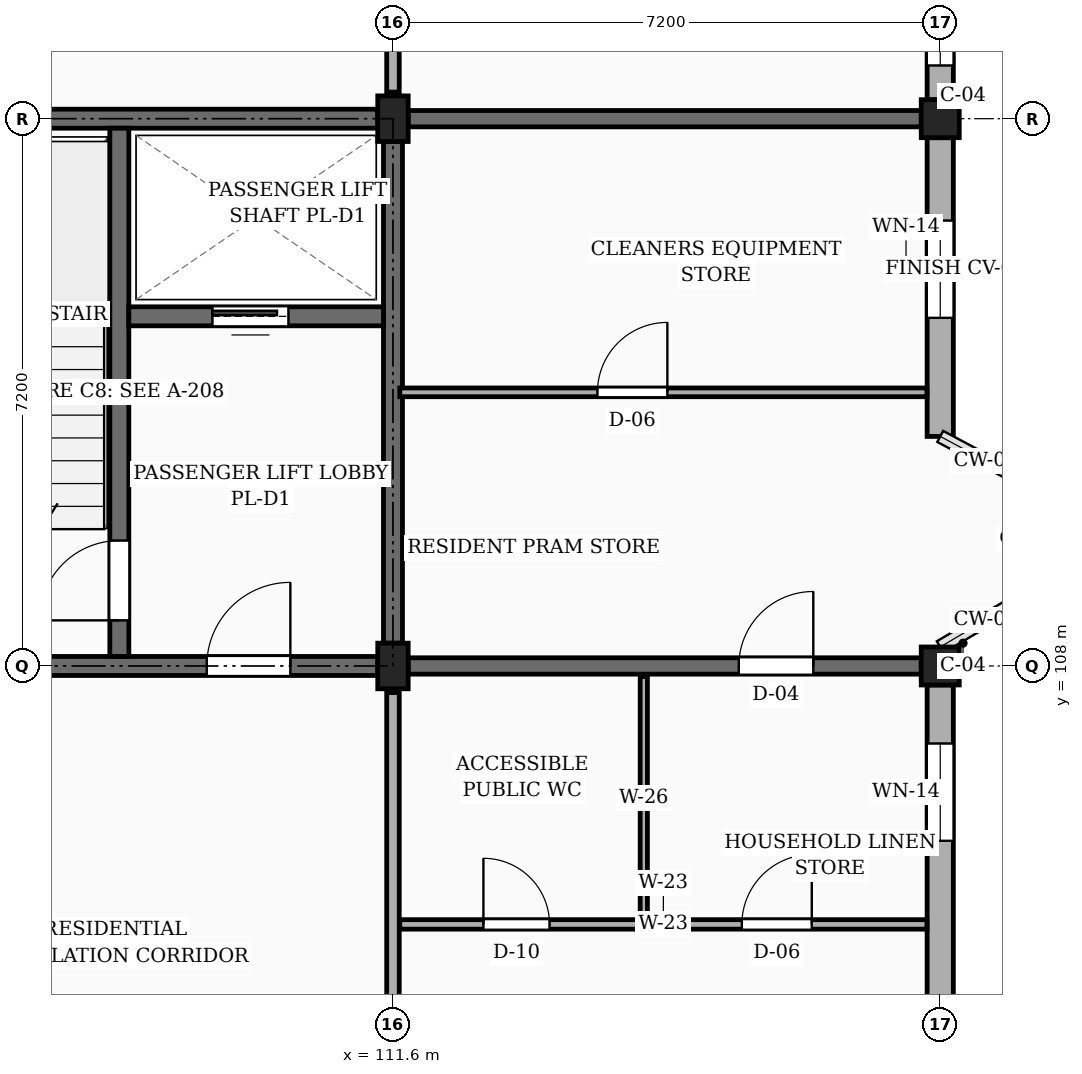
"""IFC4 building model, lengths in metres.
Left out: names, types, materials, properties, quantities, classifications, styles, units other than length and angle.
Written with IfcOpenShell. Run it as: python <this file> out.ifc"""

import sys

from ifc_helpers import new_model, si_unit, direction, frame, frame_2d, origin, origin_2d, place, context, subcontext, project, spatial, rectangle, extrude, element, fill, save


model = new_model("IFC4")
c1 = context("Model", 3, precision=1e-05, world=origin(), true_north=direction((0.0, 1.0)))
c2 = subcontext(c1, "Body", "Model", "MODEL_VIEW")
j1 = project(units=[si_unit("LENGTHUNIT", "METRE"), si_unit("PLANEANGLEUNIT", "RADIAN")], contexts=[c1])
p1 = place(None, origin())
s1 = spatial("IfcSite", under=j1, at=p1, CompositionType="ELEMENT")
p2 = place(p1, origin())
s2 = spatial("IfcBuilding", under=s1, at=p2, CompositionType="ELEMENT")
p3 = place(p2, frame((0.0, 0.0, 29.7)))
s3 = spatial("IfcBuildingStorey", under=s2, at=p3, CompositionType="ELEMENT", Elevation=29.7)
for number, where, z_axis, x_axis in (
    (1, (111.6, 108.0, 0.0), (0.0, 0.0, 1.0), (1.0, 0.0, 0.0)),
    (2, (111.6, 115.2, 0.0), (0.0, 0.0, 1.0), (1.0, 0.0, 0.0)),
):
    element("IfcColumn", number, at=place(p3, frame(where, z_axis=z_axis, x_axis=x_axis)), inside=s3, PredefinedType="COLUMN", context=c2, shape_type="SweptSolid", body=[
        extrude(rectangle(XDim=0.4, YDim=0.6, at=origin_2d()), origin(), (0.0, 0.0, 1.0), 3.15),
    ])
for number, where, z_axis, x_axis in (
    (3, (118.8, 108.0, 0.0), (0.0, 0.0, 1.0), (1.0, 0.0, 0.0)),
    (4, (118.8, 115.2, 0.0), (0.0, 0.0, 1.0), (1.0, 0.0, 0.0)),
):
    element("IfcColumn", number, at=place(p3, frame(where, z_axis=z_axis, x_axis=x_axis)), inside=s3, PredefinedType="COLUMN", context=c2, shape_type="SweptSolid", body=[
        extrude(rectangle(XDim=0.5, YDim=0.5, at=origin_2d()), origin(), (0.0, 0.0, 1.0), 3.15),
    ])
p4 = place(p3, frame((111.8, 108.0, 0.0), z_axis=(0.0, 0.0, 1.0), x_axis=(1.0, 0.0, 0.0)))
e5 = element("IfcWall", 5, at=p4, inside=s3, PredefinedType="SOLIDWALL", context=c2, shape_type="SweptSolid", body=[
    extrude(rectangle(XDim=6.75, YDim=0.215, at=frame_2d((3.375, 0.0))), origin(), (0.0, 0.0, 1.0), 2.19),
])
p5 = place(p4, frame((4.35, 0.0, 0.0)))
e6 = element("IfcOpeningElement", 6, at=p5, cuts=e5, PredefinedType="OPENING", context=c2, shape_type="SweptSolid", body=[
    extrude(rectangle(XDim=0.98, YDim=2.12, at=frame_2d((0.49, 1.06))), frame((0.0, 0.118, 0.0), z_axis=(0.0, -1.0, 0.0), x_axis=(1.0, 0.0, 0.0)), (0.0, 0.0, 1.0), 0.235),
])
p6 = place(p3, frame((111.8, 115.2, 0.0), z_axis=(0.0, 0.0, 1.0), x_axis=(1.0, 0.0, 0.0)))
e7 = element("IfcWall", 7, at=p6, inside=s3, PredefinedType="SOLIDWALL", context=c2, shape_type="SweptSolid", body=[
    extrude(rectangle(XDim=6.75, YDim=0.215, at=frame_2d((3.375, 0.0))), origin(), (0.0, 0.0, 1.0), 2.19),
])
p7 = place(p3, frame((118.8, 101.05, 0.0), z_axis=(0.0, 0.0, 1.0), x_axis=(0.0, 1.0, 0.0)))
e8 = element("IfcWall", 8, at=p7, inside=s3, PredefinedType="SOLIDWALL", context=c2, shape_type="SweptSolid", body=[
    extrude(rectangle(XDim=6.7, YDim=0.345, at=frame_2d((3.35, 0.0))), origin(), (0.0, 0.0, 1.0), 2.46),
])
p8 = place(p7, frame((0.45, 0.0, 0.78)))
e9 = element("IfcOpeningElement", 9, at=p8, cuts=e8, PredefinedType="OPENING", context=c2, shape_type="SweptSolid", body=[
    extrude(rectangle(XDim=1.12, YDim=1.26, at=frame_2d((0.56, 0.63))), frame((0.0, 0.183, 0.0), z_axis=(0.0, -1.0, 0.0), x_axis=(1.0, 0.0, 0.0)), (0.0, 0.0, 1.0), 0.365),
])
p9 = place(p7, frame((4.65, 0.0, 0.78)))
e10 = element("IfcOpeningElement", 10, at=p9, cuts=e8, PredefinedType="OPENING", context=c2, shape_type="SweptSolid", body=[
    extrude(rectangle(XDim=1.28, YDim=1.26, at=frame_2d((0.64, 0.63))), frame((0.0, 0.183, 0.0), z_axis=(0.0, -1.0, 0.0), x_axis=(1.0, 0.0, 0.0)), (0.0, 0.0, 1.0), 0.365),
])
p10 = place(p3, frame((118.8, 111.02, 0.0), z_axis=(0.0, 0.0, 1.0), x_axis=(0.0, 1.0, 0.0)))
e11 = element("IfcWall", 11, at=p10, inside=s3, PredefinedType="SOLIDWALL", context=c2, shape_type="SweptSolid", body=[
    extrude(rectangle(XDim=3.93, YDim=0.345, at=frame_2d((1.965, 0.0))), origin(), (0.0, 0.0, 1.0), 2.46),
])
p11 = place(p10, frame((1.56, 0.0, 0.78)))
e12 = element("IfcOpeningElement", 12, at=p11, cuts=e11, PredefinedType="OPENING", context=c2, shape_type="SweptSolid", body=[
    extrude(rectangle(XDim=1.28, YDim=1.26, at=frame_2d((0.64, 0.63))), frame((0.0, 0.183, 0.0), z_axis=(0.0, -1.0, 0.0), x_axis=(1.0, 0.0, 0.0)), (0.0, 0.0, 1.0), 0.365),
])
p12 = place(p3, frame((118.8, 115.45, 0.0), z_axis=(0.0, 0.0, 1.0), x_axis=(0.0, 1.0, 0.0)))
e13 = element("IfcWall", 13, at=p12, inside=s3, PredefinedType="SOLIDWALL", context=c2, shape_type="SweptSolid", body=[
    extrude(rectangle(XDim=6.7, YDim=0.345, at=frame_2d((3.35, 0.0))), origin(), (0.0, 0.0, 1.0), 2.46),
])
p13 = place(p12, frame((0.45, 0.0, 0.78)))
e14 = element("IfcOpeningElement", 14, at=p13, cuts=e13, PredefinedType="OPENING", context=c2, shape_type="SweptSolid", body=[
    extrude(rectangle(XDim=1.36, YDim=1.26, at=frame_2d((0.68, 0.63))), frame((0.0, 0.183, 0.0), z_axis=(0.0, -1.0, 0.0), x_axis=(1.0, 0.0, 0.0)), (0.0, 0.0, 1.0), 0.365),
])
p14 = place(p12, frame((4.65, 0.0, 0.78)))
e15 = element("IfcOpeningElement", 15, at=p14, cuts=e13, PredefinedType="OPENING", context=c2, shape_type="SweptSolid", body=[
    extrude(rectangle(XDim=0.9, YDim=1.36, at=frame_2d((0.45, 0.68))), frame((0.0, 0.183, 0.0), z_axis=(0.0, -1.0, 0.0), x_axis=(1.0, 0.0, 0.0)), (0.0, 0.0, 1.0), 0.365),
])
p15 = place(p3, frame((104.6, 115.2, 0.0), z_axis=(0.0, 0.0, 1.0), x_axis=(1.0, 0.0, 0.0)))
e16 = element("IfcWall", 16, at=p15, inside=s3, PredefinedType="SHEAR", context=c2, shape_type="SweptSolid", body=[
    extrude(rectangle(XDim=6.8, YDim=0.25, at=frame_2d((3.4, 0.0))), origin(), (0.0, 0.0, 1.0), 2.89),
])
p16 = place(p3, frame((111.6, 108.3, 0.0), z_axis=(0.0, 0.0, 1.0), x_axis=(0.0, 1.0, 0.0)))
e17 = element("IfcWall", 17, at=p16, inside=s3, PredefinedType="SHEAR", context=c2, shape_type="SweptSolid", body=[
    extrude(rectangle(XDim=6.6, YDim=0.25, at=frame_2d((3.3, 0.0))), origin(), (0.0, 0.0, 1.0), 2.89),
])
p17 = place(p3, frame((104.6, 108.0, 0.0), z_axis=(0.0, 0.0, 1.0), x_axis=(1.0, 0.0, 0.0)))
e18 = element("IfcWall", 18, at=p17, inside=s3, PredefinedType="SHEAR", context=c2, shape_type="SweptSolid", body=[
    extrude(rectangle(XDim=6.8, YDim=0.25, at=frame_2d((3.4, 0.0))), origin(), (0.0, 0.0, 1.0), 2.89),
])
p18 = place(p17, frame((4.55, 0.0, 0.0)))
e19 = element("IfcOpeningElement", 19, at=p18, cuts=e18, PredefinedType="OPENING", context=c2, shape_type="SweptSolid", body=[
    extrude(rectangle(XDim=1.1, YDim=2.15, at=frame_2d((0.55, 1.075))), frame((0.0, 0.135, 0.0), z_axis=(0.0, -1.0, 0.0), x_axis=(1.0, 0.0, 0.0)), (0.0, 0.0, 1.0), 0.27),
])
p19 = place(p3, frame((108.0, 108.125, 0.0), z_axis=(0.0, 0.0, 1.0), x_axis=(0.0, 1.0, 0.0)))
e20 = element("IfcWall", 20, at=p19, inside=s3, PredefinedType="SHEAR", context=c2, shape_type="SweptSolid", body=[
    extrude(rectangle(XDim=6.95, YDim=0.25, at=frame_2d((3.475, 0.0))), origin(), (0.0, 0.0, 1.0), 2.89),
])
p20 = place(p19, frame((0.475, 0.0, 0.0)))
e21 = element("IfcOpeningElement", 21, at=p20, cuts=e20, PredefinedType="OPENING", context=c2, shape_type="SweptSolid", body=[
    extrude(rectangle(XDim=1.05, YDim=2.15, at=frame_2d((0.525, 1.075))), frame((0.0, 0.135, 0.0), z_axis=(0.0, -1.0, 0.0), x_axis=(1.0, 0.0, 0.0)), (0.0, 0.0, 1.0), 0.27),
])
p21 = place(p3, frame((108.125, 112.6, 0.0), z_axis=(0.0, 0.0, 1.0), x_axis=(1.0, 0.0, 0.0)))
e22 = element("IfcWall", 22, at=p21, inside=s3, PredefinedType="SHEAR", context=c2, shape_type="SweptSolid", body=[
    extrude(rectangle(XDim=3.35, YDim=0.25, at=frame_2d((1.675, 0.0))), origin(), (0.0, 0.0, 1.0), 2.89),
])
p22 = place(p21, frame((1.1, 0.0, 0.0)))
e23 = element("IfcOpeningElement", 23, at=p22, cuts=e22, PredefinedType="OPENING", context=c2, shape_type="SweptSolid", body=[
    extrude(rectangle(XDim=1.0, YDim=2.2, at=frame_2d((0.5, 1.1))), frame((0.0, 0.135, 0.0), z_axis=(0.0, -1.0, 0.0), x_axis=(1.0, 0.0, 0.0)), (0.0, 0.0, 1.0), 0.27),
])
p23 = place(p3, frame((111.6, 101.15, 0.0), z_axis=(0.0, 0.0, 1.0), x_axis=(0.0, 1.0, 0.0)))
e24 = element("IfcWall", 24, at=p23, inside=s3, PredefinedType="PARTITIONING", context=c2, shape_type="SweptSolid", body=[
    extrude(rectangle(XDim=6.5, YDim=0.165, at=frame_2d((3.25, 0.0))), origin(), (0.0, 0.0, 1.0), 2.325),
])
p24 = place(p23, frame((1.1, 0.0, 0.0)))
e25 = element("IfcOpeningElement", 25, at=p24, cuts=e24, PredefinedType="OPENING", context=c2, shape_type="SweptSolid", body=[
    extrude(rectangle(XDim=0.94, YDim=2.12, at=frame_2d((0.47, 1.06))), frame((0.0, 0.093, 0.0), z_axis=(0.0, -1.0, 0.0), x_axis=(1.0, 0.0, 0.0)), (0.0, 0.0, 1.0), 0.185),
])
p25 = place(p3, frame((111.6, 115.55, 0.0), z_axis=(0.0, 0.0, 1.0), x_axis=(0.0, 1.0, 0.0)))
e26 = element("IfcWall", 26, at=p25, inside=s3, PredefinedType="PARTITIONING", context=c2, shape_type="SweptSolid", body=[
    extrude(rectangle(XDim=6.5, YDim=0.165, at=frame_2d((3.25, 0.0))), origin(), (0.0, 0.0, 1.0), 2.325),
])
p26 = place(p25, frame((1.1, 0.0, 0.0)))
e27 = element("IfcOpeningElement", 27, at=p26, cuts=e26, PredefinedType="OPENING", context=c2, shape_type="SweptSolid", body=[
    extrude(rectangle(XDim=1.14, YDim=2.18, at=frame_2d((0.57, 1.09))), frame((0.0, 0.093, 0.0), z_axis=(0.0, -1.0, 0.0), x_axis=(1.0, 0.0, 0.0)), (0.0, 0.0, 1.0), 0.185),
])
p27 = place(p3, frame((111.69, 104.6, 0.0), z_axis=(0.0, 0.0, 1.0), x_axis=(1.0, 0.0, 0.0)))
e28 = element("IfcWall", 28, at=p27, inside=s3, PredefinedType="PARTITIONING", context=c2, shape_type="SweptSolid", body=[
    extrude(rectangle(XDim=6.935, YDim=0.125, at=frame_2d((3.468, 0.0))), origin(), (0.0, 0.0, 1.0), 2.325),
])
p28 = place(p27, frame((1.1, 0.0, 0.0)))
e29 = element("IfcOpeningElement", 29, at=p28, cuts=e28, PredefinedType="OPENING", context=c2, shape_type="SweptSolid", body=[
    extrude(rectangle(XDim=0.87, YDim=2.05, at=frame_2d((0.435, 1.025))), frame((0.0, 0.073, 0.0), z_axis=(0.0, -1.0, 0.0), x_axis=(1.0, 0.0, 0.0)), (0.0, 0.0, 1.0), 0.145),
])
p29 = place(p27, frame((4.5, 0.0, 0.0)))
e30 = element("IfcOpeningElement", 30, at=p29, cuts=e28, PredefinedType="OPENING", context=c2, shape_type="SweptSolid", body=[
    extrude(rectangle(XDim=0.92, YDim=2.1, at=frame_2d((0.46, 1.05))), frame((0.0, 0.073, 0.0), z_axis=(0.0, -1.0, 0.0), x_axis=(1.0, 0.0, 0.0)), (0.0, 0.0, 1.0), 0.145),
])
p30 = place(p3, frame((114.9, 104.67, 0.0), z_axis=(0.0, 0.0, 1.0), x_axis=(0.0, 1.0, 0.0)))
e31 = element("IfcWall", 31, at=p30, inside=s3, PredefinedType="PARTITIONING", context=c2, shape_type="SweptSolid", body=[
    extrude(rectangle(XDim=3.19, YDim=0.095, at=frame_2d((1.595, 0.0))), origin(), (0.0, 0.0, 1.0), 2.325),
])
p31 = place(p3, frame((111.69, 111.6, 0.0), z_axis=(0.0, 0.0, 1.0), x_axis=(1.0, 0.0, 0.0)))
e32 = element("IfcWall", 32, at=p31, inside=s3, PredefinedType="PARTITIONING", context=c2, shape_type="SweptSolid", body=[
    extrude(rectangle(XDim=6.935, YDim=0.115, at=frame_2d((3.468, 0.0))), origin(), (0.0, 0.0, 1.0), 2.325),
])
p32 = place(p31, frame((2.6, 0.0, 0.0)))
e33 = element("IfcOpeningElement", 33, at=p32, cuts=e32, PredefinedType="OPENING", context=c2, shape_type="SweptSolid", body=[
    extrude(rectangle(XDim=0.92, YDim=2.1, at=frame_2d((0.46, 1.05))), frame((0.0, 0.067, 0.0), z_axis=(0.0, -1.0, 0.0), x_axis=(1.0, 0.0, 0.0)), (0.0, 0.0, 1.0), 0.135),
])
p33 = place(p9, origin())
e34 = element("IfcWindow", 34, at=p33, inside=s3, PartitioningType="SINGLE_PANEL", PredefinedType="WINDOW", context=c2, shape_type="SweptSolid", body=[
    extrude(rectangle(XDim=1.28, YDim=1.26, at=frame_2d((0.64, 0.63))), frame((0.0, 0.03, 0.0), z_axis=(0.0, -1.0, 0.0), x_axis=(1.0, 0.0, 0.0)), (0.0, 0.0, 1.0), 0.06),
])
fill(e10, e34)
p34 = place(p11, origin())
e35 = element("IfcWindow", 35, at=p34, inside=s3, PartitioningType="SINGLE_PANEL", PredefinedType="WINDOW", context=c2, shape_type="SweptSolid", body=[
    extrude(rectangle(XDim=1.28, YDim=1.26, at=frame_2d((0.64, 0.63))), frame((0.0, 0.03, 0.0), z_axis=(0.0, -1.0, 0.0), x_axis=(1.0, 0.0, 0.0)), (0.0, 0.0, 1.0), 0.06),
])
fill(e12, e35)
p35 = place(p13, origin())
e36 = element("IfcWindow", 36, at=p35, inside=s3, PartitioningType="SINGLE_PANEL", PredefinedType="WINDOW", context=c2, shape_type="SweptSolid", body=[
    extrude(rectangle(XDim=1.36, YDim=1.26, at=frame_2d((0.68, 0.63))), frame((0.0, 0.03, 0.0), z_axis=(0.0, -1.0, 0.0), x_axis=(1.0, 0.0, 0.0)), (0.0, 0.0, 1.0), 0.06),
])
fill(e14, e36)
p36 = place(p18, frame((1.1, 0.0, 0.0), z_axis=(0.0, 0.0, 1.0), x_axis=(-1.0, 0.0, 0.0)))
e37 = element("IfcDoor", 37, at=p36, inside=s3, OperationType="SINGLE_SWING_RIGHT", PredefinedType="DOOR", context=c2, shape_type="SweptSolid", body=[
    extrude(rectangle(XDim=1.1, YDim=2.15, at=frame_2d((0.55, 1.075))), frame((0.0, 0.025, 0.0), z_axis=(0.0, -1.0, 0.0), x_axis=(1.0, 0.0, 0.0)), (0.0, 0.0, 1.0), 0.05),
])
fill(e19, e37)
p37 = place(p20, origin())
e38 = element("IfcDoor", 38, at=p37, inside=s3, OperationType="SINGLE_SWING_LEFT", PredefinedType="DOOR", context=c2, shape_type="SweptSolid", body=[
    extrude(rectangle(XDim=1.05, YDim=2.15, at=frame_2d((0.525, 1.075))), frame((0.0, 0.025, 0.0), z_axis=(0.0, -1.0, 0.0), x_axis=(1.0, 0.0, 0.0)), (0.0, 0.0, 1.0), 0.05),
])
fill(e21, e38)
p38 = place(p22, origin())
e39 = element("IfcDoor", 39, at=p38, inside=s3, OperationType="SLIDING_TO_LEFT", PredefinedType="DOOR", context=c2, shape_type="SweptSolid", body=[
    extrude(rectangle(XDim=1.0, YDim=2.2, at=frame_2d((0.5, 1.1))), frame((0.0, 0.025, 0.0), z_axis=(0.0, -1.0, 0.0), x_axis=(1.0, 0.0, 0.0)), (0.0, 0.0, 1.0), 0.05),
])
fill(e23, e39)
p39 = place(p28, origin())
e40 = element("IfcDoor", 40, at=p39, inside=s3, OperationType="SINGLE_SWING_LEFT", PredefinedType="DOOR", context=c2, shape_type="SweptSolid", body=[
    extrude(rectangle(XDim=0.87, YDim=2.05, at=frame_2d((0.435, 1.025))), frame((0.0, 0.025, 0.0), z_axis=(0.0, -1.0, 0.0), x_axis=(1.0, 0.0, 0.0)), (0.0, 0.0, 1.0), 0.05),
])
fill(e29, e40)
p40 = place(p29, origin())
e41 = element("IfcDoor", 41, at=p40, inside=s3, OperationType="SINGLE_SWING_RIGHT", PredefinedType="DOOR", context=c2, shape_type="SweptSolid", body=[
    extrude(rectangle(XDim=0.92, YDim=2.1, at=frame_2d((0.46, 1.05))), frame((0.0, 0.025, 0.0), z_axis=(0.0, -1.0, 0.0), x_axis=(1.0, 0.0, 0.0)), (0.0, 0.0, 1.0), 0.05),
])
fill(e30, e41)
p41 = place(p32, origin())
e42 = element("IfcDoor", 42, at=p41, inside=s3, OperationType="SINGLE_SWING_RIGHT", PredefinedType="DOOR", context=c2, shape_type="SweptSolid", body=[
    extrude(rectangle(XDim=0.92, YDim=2.1, at=frame_2d((0.46, 1.05))), frame((0.0, 0.025, 0.0), z_axis=(0.0, -1.0, 0.0), x_axis=(1.0, 0.0, 0.0)), (0.0, 0.0, 1.0), 0.05),
])
fill(e33, e42)
p42 = place(p5, origin())
e43 = element("IfcDoor", 43, at=p42, inside=s3, OperationType="SINGLE_SWING_RIGHT", PredefinedType="DOOR", context=c2, shape_type="SweptSolid", body=[
    extrude(rectangle(XDim=0.98, YDim=2.12, at=frame_2d((0.49, 1.06))), frame((0.0, 0.025, 0.0), z_axis=(0.0, -1.0, 0.0), x_axis=(1.0, 0.0, 0.0)), (0.0, 0.0, 1.0), 0.05),
])
fill(e6, e43)
save(model, sys.argv[1])
